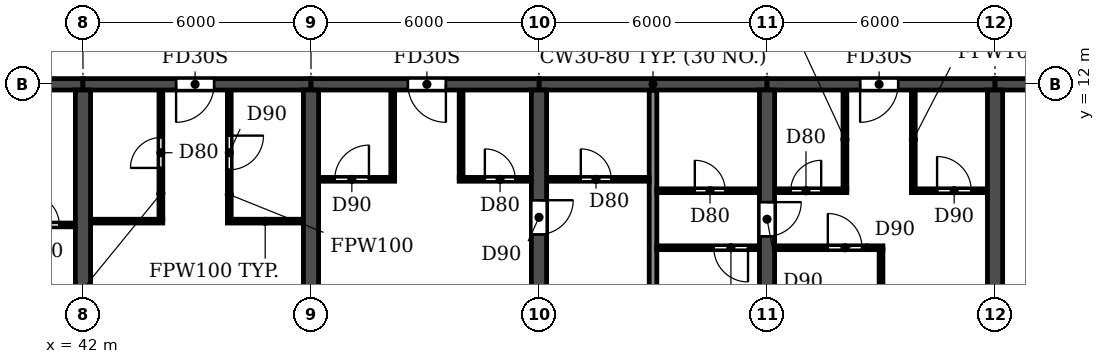
"""IFC4 building model, lengths in metres.
Left out: names, types, materials, properties, quantities, classifications, styles, units other than length and angle.
Written with IfcOpenShell. Run it as: python <this file> out.ifc"""

import sys

from ifc_helpers import new_model, si_unit, direction, frame, frame_2d, origin, place, context, subcontext, project, spatial, rectangle, extrude, element, fill, save


model = new_model("IFC4")
c1 = context("Model", 3, precision=1e-05, world=origin(), true_north=direction((0.0, 1.0)))
c2 = subcontext(c1, "Body", "Model", "MODEL_VIEW")
j1 = project(units=[si_unit("LENGTHUNIT", "METRE"), si_unit("PLANEANGLEUNIT", "RADIAN")], contexts=[c1])
p1 = place(None, origin())
s1 = spatial("IfcSite", under=j1, at=p1, CompositionType="ELEMENT")
p2 = place(p1, origin())
s2 = spatial("IfcBuilding", under=s1, at=p2, CompositionType="ELEMENT")
p3 = place(p2, frame((0.0, 0.0, 43.2)))
s3 = spatial("IfcBuildingStorey", under=s2, at=p3, CompositionType="ELEMENT", Elevation=43.2)
for number, where, z_axis, x_axis in (
    (1, (42.0, 0.2, 0.0), (0.0, 0.0, 1.0), (0.0, 1.0, 0.0)),
    (2, (48.0, 0.2, 0.0), (0.0, 0.0, 1.0), (0.0, 1.0, 0.0)),
):
    element("IfcWall", number, at=place(p3, frame(where, z_axis=z_axis, x_axis=x_axis)), inside=s3, PredefinedType="SHEAR", context=c2, shape_type="SweptSolid", body=[
        extrude(rectangle(XDim=11.65, YDim=0.4, at=frame_2d((5.825, 0.0))), origin(), (0.0, 0.0, 1.0), 3.05),
    ])
p4 = place(p3, frame((54.0, 0.2, 0.0), z_axis=(0.0, 0.0, 1.0), x_axis=(0.0, 1.0, 0.0)))
e3 = element("IfcWall", 3, at=p4, inside=s3, PredefinedType="SHEAR", context=c2, shape_type="SweptSolid", body=[
    extrude(rectangle(XDim=11.65, YDim=0.4, at=frame_2d((5.825, 0.0))), origin(), (0.0, 0.0, 1.0), 3.05),
])
p5 = place(p4, frame((7.85, 0.0, 0.0)))
e4 = element("IfcOpeningElement", 4, at=p5, cuts=e3, PredefinedType="OPENING", context=c2, shape_type="SweptSolid", body=[
    extrude(rectangle(XDim=0.9, YDim=2.1, at=frame_2d((0.45, 1.05))), frame((0.0, 0.21, 0.0), z_axis=(0.0, -1.0, 0.0), x_axis=(1.0, 0.0, 0.0)), (0.0, 0.0, 1.0), 0.42),
])
p6 = place(p3, frame((60.0, 0.2, 0.0), z_axis=(0.0, 0.0, 1.0), x_axis=(0.0, 1.0, 0.0)))
e5 = element("IfcWall", 5, at=p6, inside=s3, PredefinedType="SHEAR", context=c2, shape_type="SweptSolid", body=[
    extrude(rectangle(XDim=11.65, YDim=0.4, at=frame_2d((5.825, 0.0))), origin(), (0.0, 0.0, 1.0), 3.05),
])
p7 = place(p6, frame((7.8, 0.0, 0.0)))
e6 = element("IfcOpeningElement", 6, at=p7, cuts=e5, PredefinedType="OPENING", context=c2, shape_type="SweptSolid", body=[
    extrude(rectangle(XDim=0.9, YDim=2.1, at=frame_2d((0.45, 1.05))), frame((0.0, 0.21, 0.0), z_axis=(0.0, -1.0, 0.0), x_axis=(1.0, 0.0, 0.0)), (0.0, 0.0, 1.0), 0.42),
])
p8 = place(p3, frame((66.0, 0.2, 0.0), z_axis=(0.0, 0.0, 1.0), x_axis=(0.0, 1.0, 0.0)))
e7 = element("IfcWall", 7, at=p8, inside=s3, PredefinedType="SHEAR", context=c2, shape_type="SweptSolid", body=[
    extrude(rectangle(XDim=11.65, YDim=0.4, at=frame_2d((5.825, 0.0))), origin(), (0.0, 0.0, 1.0), 3.05),
])
p9 = place(p3, frame((36.0, 12.0, 0.0), z_axis=(0.0, 0.0, 1.0), x_axis=(1.0, 0.0, 0.0)))
e8 = element("IfcWall", 8, at=p9, inside=s3, PredefinedType="SHEAR", context=c2, shape_type="SweptSolid", body=[
    extrude(rectangle(XDim=6.0, YDim=0.3, at=frame_2d((3.0, 0.0))), origin(), (0.0, 0.0, 1.0), 2.45),
])
p10 = place(p9, frame((2.55, 0.0, 0.0)))
e9 = element("IfcOpeningElement", 9, at=p10, cuts=e8, PredefinedType="OPENING", context=c2, shape_type="SweptSolid", body=[
    extrude(rectangle(XDim=1.0, YDim=2.1, at=frame_2d((0.5, 1.05))), frame((0.0, 0.16, 0.0), z_axis=(0.0, -1.0, 0.0), x_axis=(1.0, 0.0, 0.0)), (0.0, 0.0, 1.0), 0.32),
])
p11 = place(p3, frame((42.0, 12.0, 0.0), z_axis=(0.0, 0.0, 1.0), x_axis=(1.0, 0.0, 0.0)))
e10 = element("IfcWall", 10, at=p11, inside=s3, PredefinedType="SHEAR", context=c2, shape_type="SweptSolid", body=[
    extrude(rectangle(XDim=6.0, YDim=0.3, at=frame_2d((3.0, 0.0))), origin(), (0.0, 0.0, 1.0), 2.45),
])
p12 = place(p11, frame((2.45, 0.0, 0.0)))
e11 = element("IfcOpeningElement", 11, at=p12, cuts=e10, PredefinedType="OPENING", context=c2, shape_type="SweptSolid", body=[
    extrude(rectangle(XDim=1.0, YDim=2.1, at=frame_2d((0.5, 1.05))), frame((0.0, 0.16, 0.0), z_axis=(0.0, -1.0, 0.0), x_axis=(1.0, 0.0, 0.0)), (0.0, 0.0, 1.0), 0.32),
])
p13 = place(p3, frame((48.0, 12.0, 0.0), z_axis=(0.0, 0.0, 1.0), x_axis=(1.0, 0.0, 0.0)))
e12 = element("IfcWall", 12, at=p13, inside=s3, PredefinedType="SHEAR", context=c2, shape_type="SweptSolid", body=[
    extrude(rectangle(XDim=6.0, YDim=0.3, at=frame_2d((3.0, 0.0))), origin(), (0.0, 0.0, 1.0), 2.45),
])
p14 = place(p13, frame((2.55, 0.0, 0.0)))
e13 = element("IfcOpeningElement", 13, at=p14, cuts=e12, PredefinedType="OPENING", context=c2, shape_type="SweptSolid", body=[
    extrude(rectangle(XDim=1.0, YDim=2.1, at=frame_2d((0.5, 1.05))), frame((0.0, 0.16, 0.0), z_axis=(0.0, -1.0, 0.0), x_axis=(1.0, 0.0, 0.0)), (0.0, 0.0, 1.0), 0.32),
])
p15 = place(p3, frame((54.0, 12.0, 0.0), z_axis=(0.0, 0.0, 1.0), x_axis=(1.0, 0.0, 0.0)))
e14 = element("IfcWall", 14, at=p15, inside=s3, PredefinedType="SHEAR", context=c2, shape_type="SweptSolid", body=[
    extrude(rectangle(XDim=6.0, YDim=0.3, at=frame_2d((3.0, 0.0))), origin(), (0.0, 0.0, 1.0), 2.45),
])
p16 = place(p3, frame((60.0, 12.0, 0.0), z_axis=(0.0, 0.0, 1.0), x_axis=(1.0, 0.0, 0.0)))
e15 = element("IfcWall", 15, at=p16, inside=s3, PredefinedType="SHEAR", context=c2, shape_type="SweptSolid", body=[
    extrude(rectangle(XDim=6.0, YDim=0.3, at=frame_2d((3.0, 0.0))), origin(), (0.0, 0.0, 1.0), 2.45),
])
p17 = place(p16, frame((2.45, 0.0, 0.0)))
e16 = element("IfcOpeningElement", 16, at=p17, cuts=e15, PredefinedType="OPENING", context=c2, shape_type="SweptSolid", body=[
    extrude(rectangle(XDim=1.0, YDim=2.1, at=frame_2d((0.5, 1.05))), frame((0.0, 0.16, 0.0), z_axis=(0.0, -1.0, 0.0), x_axis=(1.0, 0.0, 0.0)), (0.0, 0.0, 1.0), 0.32),
])
p18 = place(p3, frame((66.0, 12.0, 0.0), z_axis=(0.0, 0.0, 1.0), x_axis=(1.0, 0.0, 0.0)))
e17 = element("IfcWall", 17, at=p18, inside=s3, PredefinedType="SHEAR", context=c2, shape_type="SweptSolid", body=[
    extrude(rectangle(XDim=6.0, YDim=0.3, at=frame_2d((3.0, 0.0))), origin(), (0.0, 0.0, 1.0), 2.45),
])
p19 = place(p18, frame((2.55, 0.0, 0.0)))
e18 = element("IfcOpeningElement", 18, at=p19, cuts=e17, PredefinedType="OPENING", context=c2, shape_type="SweptSolid", body=[
    extrude(rectangle(XDim=1.0, YDim=2.1, at=frame_2d((0.5, 1.05))), frame((0.0, 0.16, 0.0), z_axis=(0.0, -1.0, 0.0), x_axis=(1.0, 0.0, 0.0)), (0.0, 0.0, 1.0), 0.32),
])
p20 = place(p3, frame((57.0, 0.06, 0.0), z_axis=(0.0, 0.0, 1.0), x_axis=(0.0, 1.0, 0.0)))
e19 = element("IfcWall", 19, at=p20, inside=s3, PredefinedType="PARTITIONING", context=c2, shape_type="SweptSolid", body=[
    extrude(rectangle(XDim=11.78, YDim=0.2, at=frame_2d((5.89, 0.0))), origin(), (0.0, 0.0, 1.0), 3.05),
])
p21 = place(p3, frame((57.1, 7.7, 0.0), z_axis=(0.0, 0.0, 1.0), x_axis=(1.0, 0.0, 0.0)))
e20 = element("IfcWall", 20, at=p21, inside=s3, PredefinedType="PARTITIONING", context=c2, shape_type="SweptSolid", body=[
    extrude(rectangle(XDim=2.69, YDim=0.1, at=frame_2d((1.345, 0.0))), origin(), (0.0, 0.0, 1.0), 3.05),
])
p22 = place(p21, frame((1.5, 0.0, 0.0)))
e21 = element("IfcOpeningElement", 21, at=p22, cuts=e20, PredefinedType="OPENING", context=c2, shape_type="SweptSolid", body=[
    extrude(rectangle(XDim=0.9, YDim=2.1, at=frame_2d((0.45, 1.05))), frame((0.0, 0.06, 0.0), z_axis=(0.0, -1.0, 0.0), x_axis=(1.0, 0.0, 0.0)), (0.0, 0.0, 1.0), 0.12),
])
p23 = place(p3, frame((60.21, 7.7, 0.0), z_axis=(0.0, 0.0, 1.0), x_axis=(1.0, 0.0, 0.0)))
e22 = element("IfcWall", 22, at=p23, inside=s3, PredefinedType="PARTITIONING", context=c2, shape_type="SweptSolid", body=[
    extrude(rectangle(XDim=2.84, YDim=0.1, at=frame_2d((1.42, 0.0))), origin(), (0.0, 0.0, 1.0), 3.05),
])
p24 = place(p23, frame((1.39, 0.0, 0.0)))
e23 = element("IfcOpeningElement", 23, at=p24, cuts=e22, PredefinedType="OPENING", context=c2, shape_type="SweptSolid", body=[
    extrude(rectangle(XDim=0.9, YDim=2.1, at=frame_2d((0.45, 1.05))), frame((0.0, 0.06, 0.0), z_axis=(0.0, -1.0, 0.0), x_axis=(1.0, 0.0, 0.0)), (0.0, 0.0, 1.0), 0.12),
])
p25 = place(p3, frame((39.9, 8.3, 0.0), z_axis=(0.0, 0.0, 1.0), x_axis=(1.0, 0.0, 0.0)))
e24 = element("IfcWall", 24, at=p25, inside=s3, PredefinedType="PARTITIONING", context=c2, shape_type="SweptSolid", body=[
    extrude(rectangle(XDim=1.89, YDim=0.1, at=frame_2d((0.945, 0.0))), origin(), (0.0, 0.0, 1.0), 3.05),
])
p26 = place(p25, frame((0.675, 0.0, 0.0)))
e25 = element("IfcOpeningElement", 25, at=p26, cuts=e24, PredefinedType="OPENING", context=c2, shape_type="SweptSolid", body=[
    extrude(rectangle(XDim=0.8, YDim=2.1, at=frame_2d((0.4, 1.05))), frame((0.0, 0.06, 0.0), z_axis=(0.0, -1.0, 0.0), x_axis=(1.0, 0.0, 0.0)), (0.0, 0.0, 1.0), 0.12),
])
p27 = place(p3, frame((42.21, 8.4, 0.0), z_axis=(0.0, 0.0, 1.0), x_axis=(1.0, 0.0, 0.0)))
e26 = element("IfcWall", 26, at=p27, inside=s3, PredefinedType="PARTITIONING", context=c2, shape_type="SweptSolid", body=[
    extrude(rectangle(XDim=1.89, YDim=0.1, at=frame_2d((0.945, 0.0))), origin(), (0.0, 0.0, 1.0), 3.05),
])
p28 = place(p3, frame((45.8, 8.4, 0.0), z_axis=(0.0, 0.0, 1.0), x_axis=(1.0, 0.0, 0.0)))
e27 = element("IfcWall", 27, at=p28, inside=s3, PredefinedType="PARTITIONING", context=c2, shape_type="SweptSolid", body=[
    extrude(rectangle(XDim=1.99, YDim=0.1, at=frame_2d((0.995, 0.0))), origin(), (0.0, 0.0, 1.0), 3.05),
])
p29 = place(p3, frame((57.1, 9.2, 0.0), z_axis=(0.0, 0.0, 1.0), x_axis=(1.0, 0.0, 0.0)))
e28 = element("IfcWall", 28, at=p29, inside=s3, PredefinedType="PARTITIONING", context=c2, shape_type="SweptSolid", body=[
    extrude(rectangle(XDim=2.69, YDim=0.1, at=frame_2d((1.345, 0.0))), origin(), (0.0, 0.0, 1.0), 3.05),
])
p30 = place(p29, frame((1.0, 0.0, 0.0)))
e29 = element("IfcOpeningElement", 29, at=p30, cuts=e28, PredefinedType="OPENING", context=c2, shape_type="SweptSolid", body=[
    extrude(rectangle(XDim=0.8, YDim=2.1, at=frame_2d((0.4, 1.05))), frame((0.0, 0.06, 0.0), z_axis=(0.0, -1.0, 0.0), x_axis=(1.0, 0.0, 0.0)), (0.0, 0.0, 1.0), 0.12),
])
p31 = place(p3, frame((60.21, 9.2, 0.0), z_axis=(0.0, 0.0, 1.0), x_axis=(1.0, 0.0, 0.0)))
e30 = element("IfcWall", 30, at=p31, inside=s3, PredefinedType="PARTITIONING", context=c2, shape_type="SweptSolid", body=[
    extrude(rectangle(XDim=1.89, YDim=0.1, at=frame_2d((0.945, 0.0))), origin(), (0.0, 0.0, 1.0), 3.05),
])
p32 = place(p31, frame((0.415, 0.0, 0.0)))
e31 = element("IfcOpeningElement", 31, at=p32, cuts=e30, PredefinedType="OPENING", context=c2, shape_type="SweptSolid", body=[
    extrude(rectangle(XDim=0.8, YDim=2.1, at=frame_2d((0.4, 1.05))), frame((0.0, 0.06, 0.0), z_axis=(0.0, -1.0, 0.0), x_axis=(1.0, 0.0, 0.0)), (0.0, 0.0, 1.0), 0.12),
])
p33 = place(p3, frame((63.8, 9.2, 0.0), z_axis=(0.0, 0.0, 1.0), x_axis=(1.0, 0.0, 0.0)))
e32 = element("IfcWall", 32, at=p33, inside=s3, PredefinedType="PARTITIONING", context=c2, shape_type="SweptSolid", body=[
    extrude(rectangle(XDim=1.99, YDim=0.1, at=frame_2d((0.995, 0.0))), origin(), (0.0, 0.0, 1.0), 3.05),
])
p34 = place(p33, frame((0.675, 0.0, 0.0)))
e33 = element("IfcOpeningElement", 33, at=p34, cuts=e32, PredefinedType="OPENING", context=c2, shape_type="SweptSolid", body=[
    extrude(rectangle(XDim=0.9, YDim=2.1, at=frame_2d((0.45, 1.05))), frame((0.0, 0.06, 0.0), z_axis=(0.0, -1.0, 0.0), x_axis=(1.0, 0.0, 0.0)), (0.0, 0.0, 1.0), 0.12),
])
p35 = place(p3, frame((48.21, 9.5, 0.0), z_axis=(0.0, 0.0, 1.0), x_axis=(1.0, 0.0, 0.0)))
e34 = element("IfcWall", 34, at=p35, inside=s3, PredefinedType="PARTITIONING", context=c2, shape_type="SweptSolid", body=[
    extrude(rectangle(XDim=1.99, YDim=0.1, at=frame_2d((0.995, 0.0))), origin(), (0.0, 0.0, 1.0), 3.05),
])
p36 = place(p35, frame((0.415, 0.0, 0.0)))
e35 = element("IfcOpeningElement", 35, at=p36, cuts=e34, PredefinedType="OPENING", context=c2, shape_type="SweptSolid", body=[
    extrude(rectangle(XDim=0.9, YDim=2.1, at=frame_2d((0.45, 1.05))), frame((0.0, 0.06, 0.0), z_axis=(0.0, -1.0, 0.0), x_axis=(1.0, 0.0, 0.0)), (0.0, 0.0, 1.0), 0.12),
])
p37 = place(p3, frame((51.9, 9.5, 0.0), z_axis=(0.0, 0.0, 1.0), x_axis=(1.0, 0.0, 0.0)))
e36 = element("IfcWall", 36, at=p37, inside=s3, PredefinedType="PARTITIONING", context=c2, shape_type="SweptSolid", body=[
    extrude(rectangle(XDim=1.89, YDim=0.1, at=frame_2d((0.945, 0.0))), origin(), (0.0, 0.0, 1.0), 3.05),
])
p38 = place(p37, frame((0.675, 0.0, 0.0)))
e37 = element("IfcOpeningElement", 37, at=p38, cuts=e36, PredefinedType="OPENING", context=c2, shape_type="SweptSolid", body=[
    extrude(rectangle(XDim=0.8, YDim=2.1, at=frame_2d((0.4, 1.05))), frame((0.0, 0.06, 0.0), z_axis=(0.0, -1.0, 0.0), x_axis=(1.0, 0.0, 0.0)), (0.0, 0.0, 1.0), 0.12),
])
p39 = place(p3, frame((54.21, 9.5, 0.0), z_axis=(0.0, 0.0, 1.0), x_axis=(1.0, 0.0, 0.0)))
e38 = element("IfcWall", 38, at=p39, inside=s3, PredefinedType="PARTITIONING", context=c2, shape_type="SweptSolid", body=[
    extrude(rectangle(XDim=2.69, YDim=0.1, at=frame_2d((1.345, 0.0))), origin(), (0.0, 0.0, 1.0), 3.05),
])
p40 = place(p39, frame((0.89, 0.0, 0.0)))
e39 = element("IfcOpeningElement", 39, at=p40, cuts=e38, PredefinedType="OPENING", context=c2, shape_type="SweptSolid", body=[
    extrude(rectangle(XDim=0.8, YDim=2.1, at=frame_2d((0.4, 1.05))), frame((0.0, 0.06, 0.0), z_axis=(0.0, -1.0, 0.0), x_axis=(1.0, 0.0, 0.0)), (0.0, 0.0, 1.0), 0.12),
])
p41 = place(p3, frame((44.05, 8.45, 0.0), z_axis=(0.0, 0.0, 1.0), x_axis=(0.0, 1.0, 0.0)))
e40 = element("IfcWall", 40, at=p41, inside=s3, PredefinedType="PARTITIONING", context=c2, shape_type="SweptSolid", body=[
    extrude(rectangle(XDim=3.39, YDim=0.1, at=frame_2d((1.695, 0.0))), origin(), (0.0, 0.0, 1.0), 3.05),
])
p42 = place(p41, frame((1.35, 0.0, 0.0)))
e41 = element("IfcOpeningElement", 41, at=p42, cuts=e40, PredefinedType="OPENING", context=c2, shape_type="SweptSolid", body=[
    extrude(rectangle(XDim=0.8, YDim=2.1, at=frame_2d((0.4, 1.05))), frame((0.0, 0.06, 0.0), z_axis=(0.0, -1.0, 0.0), x_axis=(1.0, 0.0, 0.0)), (0.0, 0.0, 1.0), 0.12),
])
p43 = place(p3, frame((45.85, 8.45, 0.0), z_axis=(0.0, 0.0, 1.0), x_axis=(0.0, 1.0, 0.0)))
e42 = element("IfcWall", 42, at=p43, inside=s3, PredefinedType="PARTITIONING", context=c2, shape_type="SweptSolid", body=[
    extrude(rectangle(XDim=3.39, YDim=0.1, at=frame_2d((1.695, 0.0))), origin(), (0.0, 0.0, 1.0), 3.05),
])
p44 = place(p43, frame((1.3, 0.0, 0.0)))
e43 = element("IfcOpeningElement", 43, at=p44, cuts=e42, PredefinedType="OPENING", context=c2, shape_type="SweptSolid", body=[
    extrude(rectangle(XDim=0.9, YDim=2.1, at=frame_2d((0.45, 1.05))), frame((0.0, 0.06, 0.0), z_axis=(0.0, -1.0, 0.0), x_axis=(1.0, 0.0, 0.0)), (0.0, 0.0, 1.0), 0.12),
])
for number, where, z_axis, x_axis in (
    (44, (50.15, 9.55, 0.0), (0.0, 0.0, 1.0), (0.0, 1.0, 0.0)),
    (45, (51.95, 9.55, 0.0), (0.0, 0.0, 1.0), (0.0, 1.0, 0.0)),
):
    element("IfcWall", number, at=place(p3, frame(where, z_axis=z_axis, x_axis=x_axis)), inside=s3, PredefinedType="PARTITIONING", context=c2, shape_type="SweptSolid", body=[
        extrude(rectangle(XDim=2.29, YDim=0.1, at=frame_2d((1.145, 0.0))), origin(), (0.0, 0.0, 1.0), 3.05),
    ])
p45 = place(p3, frame((62.05, 9.25, 0.0), z_axis=(0.0, 0.0, 1.0), x_axis=(0.0, 1.0, 0.0)))
e46 = element("IfcWall", 46, at=p45, inside=s3, PredefinedType="PARTITIONING", context=c2, shape_type="SweptSolid", body=[
    extrude(rectangle(XDim=2.59, YDim=0.1, at=frame_2d((1.295, 0.0))), origin(), (0.0, 0.0, 1.0), 3.05),
])
p46 = place(p3, frame((63.0, 0.06, 0.0), z_axis=(0.0, 0.0, 1.0), x_axis=(0.0, 1.0, 0.0)))
e47 = element("IfcWall", 47, at=p46, inside=s3, PredefinedType="PARTITIONING", context=c2, shape_type="SweptSolid", body=[
    extrude(rectangle(XDim=7.59, YDim=0.1, at=frame_2d((3.795, 0.0))), origin(), (0.0, 0.0, 1.0), 3.05),
])
p47 = place(p3, frame((63.85, 9.25, 0.0), z_axis=(0.0, 0.0, 1.0), x_axis=(0.0, 1.0, 0.0)))
e48 = element("IfcWall", 48, at=p47, inside=s3, PredefinedType="PARTITIONING", context=c2, shape_type="SweptSolid", body=[
    extrude(rectangle(XDim=2.59, YDim=0.1, at=frame_2d((1.295, 0.0))), origin(), (0.0, 0.0, 1.0), 3.05),
])
p48 = place(p26, origin())
e49 = element("IfcDoor", 49, at=p48, inside=s3, OperationType="SINGLE_SWING_LEFT", PredefinedType="DOOR", context=c2, shape_type="SweptSolid", body=[
    extrude(rectangle(XDim=0.8, YDim=2.1, at=frame_2d((0.4, 1.05))), frame((0.0, 0.025, 0.0), z_axis=(0.0, -1.0, 0.0), x_axis=(1.0, 0.0, 0.0)), (0.0, 0.0, 1.0), 0.05),
])
fill(e25, e49)
p49 = place(p42, origin())
e50 = element("IfcDoor", 50, at=p49, inside=s3, OperationType="SINGLE_SWING_LEFT", PredefinedType="DOOR", context=c2, shape_type="SweptSolid", body=[
    extrude(rectangle(XDim=0.8, YDim=2.1, at=frame_2d((0.4, 1.05))), frame((0.0, 0.025, 0.0), z_axis=(0.0, -1.0, 0.0), x_axis=(1.0, 0.0, 0.0)), (0.0, 0.0, 1.0), 0.05),
])
fill(e41, e50)
p50 = place(p12, frame((1.0, 0.0, 0.0), z_axis=(0.0, 0.0, 1.0), x_axis=(-1.0, 0.0, 0.0)))
e51 = element("IfcDoor", 51, at=p50, inside=s3, OperationType="SINGLE_SWING_RIGHT", PredefinedType="DOOR", context=c2, shape_type="SweptSolid", body=[
    extrude(rectangle(XDim=1.0, YDim=2.1, at=frame_2d((0.5, 1.05))), frame((0.0, 0.025, 0.0), z_axis=(0.0, -1.0, 0.0), x_axis=(1.0, 0.0, 0.0)), (0.0, 0.0, 1.0), 0.05),
])
fill(e11, e51)
p51 = place(p44, frame((0.9, 0.0, 0.0), z_axis=(0.0, 0.0, 1.0), x_axis=(-1.0, 0.0, 0.0)))
e52 = element("IfcDoor", 52, at=p51, inside=s3, OperationType="SINGLE_SWING_LEFT", PredefinedType="DOOR", context=c2, shape_type="SweptSolid", body=[
    extrude(rectangle(XDim=0.9, YDim=2.1, at=frame_2d((0.45, 1.05))), frame((0.0, 0.025, 0.0), z_axis=(0.0, -1.0, 0.0), x_axis=(1.0, 0.0, 0.0)), (0.0, 0.0, 1.0), 0.05),
])
fill(e43, e52)
p52 = place(p40, origin())
e53 = element("IfcDoor", 53, at=p52, inside=s3, OperationType="SINGLE_SWING_LEFT", PredefinedType="DOOR", context=c2, shape_type="SweptSolid", body=[
    extrude(rectangle(XDim=0.8, YDim=2.1, at=frame_2d((0.4, 1.05))), frame((0.0, 0.025, 0.0), z_axis=(0.0, -1.0, 0.0), x_axis=(1.0, 0.0, 0.0)), (0.0, 0.0, 1.0), 0.05),
])
fill(e39, e53)
p53 = place(p36, origin())
e54 = element("IfcDoor", 54, at=p53, inside=s3, OperationType="SINGLE_SWING_RIGHT", PredefinedType="DOOR", context=c2, shape_type="SweptSolid", body=[
    extrude(rectangle(XDim=0.9, YDim=2.1, at=frame_2d((0.45, 1.05))), frame((0.0, 0.025, 0.0), z_axis=(0.0, -1.0, 0.0), x_axis=(1.0, 0.0, 0.0)), (0.0, 0.0, 1.0), 0.05),
])
fill(e35, e54)
p54 = place(p14, frame((1.0, 0.0, 0.0), z_axis=(0.0, 0.0, 1.0), x_axis=(-1.0, 0.0, 0.0)))
e55 = element("IfcDoor", 55, at=p54, inside=s3, OperationType="SINGLE_SWING_LEFT", PredefinedType="DOOR", context=c2, shape_type="SweptSolid", body=[
    extrude(rectangle(XDim=1.0, YDim=2.1, at=frame_2d((0.5, 1.05))), frame((0.0, 0.025, 0.0), z_axis=(0.0, -1.0, 0.0), x_axis=(1.0, 0.0, 0.0)), (0.0, 0.0, 1.0), 0.05),
])
fill(e13, e55)
p55 = place(p38, origin())
e56 = element("IfcDoor", 56, at=p55, inside=s3, OperationType="SINGLE_SWING_LEFT", PredefinedType="DOOR", context=c2, shape_type="SweptSolid", body=[
    extrude(rectangle(XDim=0.8, YDim=2.1, at=frame_2d((0.4, 1.05))), frame((0.0, 0.025, 0.0), z_axis=(0.0, -1.0, 0.0), x_axis=(1.0, 0.0, 0.0)), (0.0, 0.0, 1.0), 0.05),
])
fill(e37, e56)
p56 = place(p5, frame((0.9, 0.0, 0.0), z_axis=(0.0, 0.0, 1.0), x_axis=(-1.0, 0.0, 0.0)))
e57 = element("IfcDoor", 57, at=p56, inside=s3, OperationType="SINGLE_SWING_LEFT", PredefinedType="DOOR", context=c2, shape_type="SweptSolid", body=[
    extrude(rectangle(XDim=0.9, YDim=2.1, at=frame_2d((0.45, 1.05))), frame((0.0, 0.025, 0.0), z_axis=(0.0, -1.0, 0.0), x_axis=(1.0, 0.0, 0.0)), (0.0, 0.0, 1.0), 0.05),
])
fill(e4, e57)
p57 = place(p30, origin())
e58 = element("IfcDoor", 58, at=p57, inside=s3, OperationType="SINGLE_SWING_LEFT", PredefinedType="DOOR", context=c2, shape_type="SweptSolid", body=[
    extrude(rectangle(XDim=0.8, YDim=2.1, at=frame_2d((0.4, 1.05))), frame((0.0, 0.025, 0.0), z_axis=(0.0, -1.0, 0.0), x_axis=(1.0, 0.0, 0.0)), (0.0, 0.0, 1.0), 0.05),
])
fill(e29, e58)
p58 = place(p22, frame((0.9, 0.0, 0.0), z_axis=(0.0, 0.0, 1.0), x_axis=(-1.0, 0.0, 0.0)))
e59 = element("IfcDoor", 59, at=p58, inside=s3, OperationType="SINGLE_SWING_LEFT", PredefinedType="DOOR", context=c2, shape_type="SweptSolid", body=[
    extrude(rectangle(XDim=0.9, YDim=2.1, at=frame_2d((0.45, 1.05))), frame((0.0, 0.025, 0.0), z_axis=(0.0, -1.0, 0.0), x_axis=(1.0, 0.0, 0.0)), (0.0, 0.0, 1.0), 0.05),
])
fill(e21, e59)
p59 = place(p7, frame((0.9, 0.0, 0.0), z_axis=(0.0, 0.0, 1.0), x_axis=(-1.0, 0.0, 0.0)))
e60 = element("IfcDoor", 60, at=p59, inside=s3, OperationType="SINGLE_SWING_LEFT", PredefinedType="DOOR", context=c2, shape_type="SweptSolid", body=[
    extrude(rectangle(XDim=0.9, YDim=2.1, at=frame_2d((0.45, 1.05))), frame((0.0, 0.025, 0.0), z_axis=(0.0, -1.0, 0.0), x_axis=(1.0, 0.0, 0.0)), (0.0, 0.0, 1.0), 0.05),
])
fill(e6, e60)
p60 = place(p32, origin())
e61 = element("IfcDoor", 61, at=p60, inside=s3, OperationType="SINGLE_SWING_RIGHT", PredefinedType="DOOR", context=c2, shape_type="SweptSolid", body=[
    extrude(rectangle(XDim=0.8, YDim=2.1, at=frame_2d((0.4, 1.05))), frame((0.0, 0.025, 0.0), z_axis=(0.0, -1.0, 0.0), x_axis=(1.0, 0.0, 0.0)), (0.0, 0.0, 1.0), 0.05),
])
fill(e31, e61)
p61 = place(p24, origin())
e62 = element("IfcDoor", 62, at=p61, inside=s3, OperationType="SINGLE_SWING_LEFT", PredefinedType="DOOR", context=c2, shape_type="SweptSolid", body=[
    extrude(rectangle(XDim=0.9, YDim=2.1, at=frame_2d((0.45, 1.05))), frame((0.0, 0.025, 0.0), z_axis=(0.0, -1.0, 0.0), x_axis=(1.0, 0.0, 0.0)), (0.0, 0.0, 1.0), 0.05),
])
fill(e23, e62)
p62 = place(p17, frame((1.0, 0.0, 0.0), z_axis=(0.0, 0.0, 1.0), x_axis=(-1.0, 0.0, 0.0)))
e63 = element("IfcDoor", 63, at=p62, inside=s3, OperationType="SINGLE_SWING_RIGHT", PredefinedType="DOOR", context=c2, shape_type="SweptSolid", body=[
    extrude(rectangle(XDim=1.0, YDim=2.1, at=frame_2d((0.5, 1.05))), frame((0.0, 0.025, 0.0), z_axis=(0.0, -1.0, 0.0), x_axis=(1.0, 0.0, 0.0)), (0.0, 0.0, 1.0), 0.05),
])
fill(e16, e63)
p63 = place(p34, origin())
e64 = element("IfcDoor", 64, at=p63, inside=s3, OperationType="SINGLE_SWING_LEFT", PredefinedType="DOOR", context=c2, shape_type="SweptSolid", body=[
    extrude(rectangle(XDim=0.9, YDim=2.1, at=frame_2d((0.45, 1.05))), frame((0.0, 0.025, 0.0), z_axis=(0.0, -1.0, 0.0), x_axis=(1.0, 0.0, 0.0)), (0.0, 0.0, 1.0), 0.05),
])
fill(e33, e64)
save(model, sys.argv[1])
